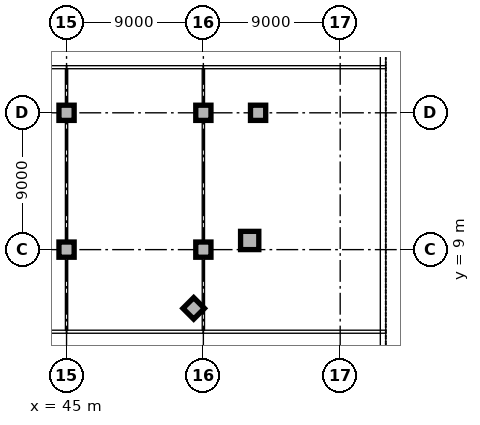
"""IFC4 building model, lengths in metres.
Left out: names, types, materials, properties, quantities, classifications, styles, units other than length and angle.
Written with IfcOpenShell. Run it as: python <this file> out.ifc"""

import sys

from ifc_helpers import new_model, si_unit, direction, frame, frame_2d, origin, origin_2d, place, context, subcontext, project, spatial, rectangle, extrude, element, fill, save


model = new_model("IFC4")
c1 = context("Model", 3, precision=1e-05, world=origin(), true_north=direction((0.0, 1.0)))
c2 = subcontext(c1, "Body", "Model", "MODEL_VIEW")
j1 = project(units=[si_unit("LENGTHUNIT", "METRE"), si_unit("PLANEANGLEUNIT", "RADIAN")], contexts=[c1])
p1 = place(None, origin())
s1 = spatial("IfcSite", under=j1, at=p1, CompositionType="ELEMENT")
p2 = place(p1, origin())
s2 = spatial("IfcBuilding", under=s1, at=p2, CompositionType="ELEMENT")
p3 = place(p2, origin())
s3 = spatial("IfcBuildingStorey", under=s2, at=p3, CompositionType="ELEMENT", Elevation=0.0)
p4 = place(p3, frame((57.047, 9.602, 0.0), z_axis=(0.0, 0.0, 1.0), x_axis=(1.0, 0.0, 0.0)))
e1 = element("IfcColumn", 1, at=p4, inside=s3, PredefinedType="COLUMN", context=c2, shape_type="SweptSolid", body=[
    extrude(rectangle(XDim=1.2, YDim=1.2, at=origin_2d()), origin(), (0.0, 0.0, 1.0), 5.7),
])
for number, where, z_axis, x_axis in (
    (2, (53.364, 5.136, 0.0), (0.0, 0.0, 1.0), (0.707, 0.707, 0.0)),
    (3, (57.6, 18.0, 0.0), (0.0, 0.0, 1.0), (1.0, 0.0, 0.0)),
    (4, (45.0, 9.0, 0.0), (0.0, 0.0, 1.0), (1.0, 0.0, 0.0)),
    (5, (45.0, 18.0, 0.0), (0.0, 0.0, 1.0), (1.0, 0.0, 0.0)),
    (6, (54.0, 9.0, 0.0), (0.0, 0.0, 1.0), (1.0, 0.0, 0.0)),
    (7, (54.0, 18.0, 0.0), (0.0, 0.0, 1.0), (1.0, 0.0, 0.0)),
):
    element("IfcColumn", number, at=place(p3, frame(where, z_axis=z_axis, x_axis=x_axis)), inside=s3, PredefinedType="COLUMN", context=c2, shape_type="SweptSolid", body=[
        extrude(rectangle(XDim=1.0, YDim=1.0, at=origin_2d()), origin(), (0.0, 0.0, 1.0), 5.7),
    ])
p5 = place(p3, frame((65.82, -9.0, 0.0), z_axis=(0.0, 0.0, 1.0), x_axis=(0.0, 1.0, 0.0)))
e8 = element("IfcWall", 8, at=p5, inside=s3, PredefinedType="STANDARD", context=c2, shape_type="SweptSolid", body=[
    extrude(rectangle(XDim=63.0, YDim=0.36, at=frame_2d((31.5, 0.0))), origin(), (0.0, 0.0, 1.0), 5.7),
])
p6 = place(p5, frame((30.6, 0.0, 0.0)))
e9 = element("IfcOpeningElement", 9, at=p6, cuts=e8, PredefinedType="OPENING", context=c2, shape_type="SweptSolid", body=[
    extrude(rectangle(XDim=1.8, YDim=2.2, at=frame_2d((0.9, 1.1))), frame((0.0, 0.19, 0.0), z_axis=(0.0, -1.0, 0.0), x_axis=(1.0, 0.0, 0.0)), (0.0, 0.0, 1.0), 0.38),
])
p7 = place(p5, frame((51.6, 0.0, 0.0)))
e10 = element("IfcOpeningElement", 10, at=p7, cuts=e8, PredefinedType="OPENING", context=c2, shape_type="SweptSolid", body=[
    extrude(rectangle(XDim=1.8, YDim=2.2, at=frame_2d((0.9, 1.1))), frame((0.0, 0.19, 0.0), z_axis=(0.0, -1.0, 0.0), x_axis=(1.0, 0.0, 0.0)), (0.0, 0.0, 1.0), 0.38),
])
p8 = place(p5, frame((9.6, 0.0, 0.0)))
e11 = element("IfcOpeningElement", 11, at=p8, cuts=e8, PredefinedType="OPENING", context=c2, shape_type="SweptSolid", body=[
    extrude(rectangle(XDim=2.4, YDim=2.2, at=frame_2d((1.2, 1.1))), frame((0.0, 0.19, 0.0), z_axis=(0.0, -1.0, 0.0), x_axis=(1.0, 0.0, 0.0)), (0.0, 0.0, 1.0), 0.38),
])
p9 = place(p5, frame((2.85, 0.0, 0.6)))
e12 = element("IfcOpeningElement", 12, at=p9, cuts=e8, PredefinedType="OPENING", context=c2, shape_type="SweptSolid", body=[
    extrude(rectangle(XDim=3.3, YDim=3.0, at=frame_2d((1.65, 1.5))), frame((0.0, 0.19, 0.0), z_axis=(0.0, -1.0, 0.0), x_axis=(1.0, 0.0, 0.0)), (0.0, 0.0, 1.0), 0.38),
])
p10 = place(p5, frame((16.35, 0.0, 0.6)))
e13 = element("IfcOpeningElement", 13, at=p10, cuts=e8, PredefinedType="OPENING", context=c2, shape_type="SweptSolid", body=[
    extrude(rectangle(XDim=3.3, YDim=3.0, at=frame_2d((1.65, 1.5))), frame((0.0, 0.19, 0.0), z_axis=(0.0, -1.0, 0.0), x_axis=(1.0, 0.0, 0.0)), (0.0, 0.0, 1.0), 0.38),
])
p11 = place(p5, frame((20.85, 0.0, 0.6)))
e14 = element("IfcOpeningElement", 14, at=p11, cuts=e8, PredefinedType="OPENING", context=c2, shape_type="SweptSolid", body=[
    extrude(rectangle(XDim=3.3, YDim=3.0, at=frame_2d((1.65, 1.5))), frame((0.0, 0.19, 0.0), z_axis=(0.0, -1.0, 0.0), x_axis=(1.0, 0.0, 0.0)), (0.0, 0.0, 1.0), 0.38),
])
p12 = place(p5, frame((25.35, 0.0, 0.6)))
e15 = element("IfcOpeningElement", 15, at=p12, cuts=e8, PredefinedType="OPENING", context=c2, shape_type="SweptSolid", body=[
    extrude(rectangle(XDim=3.3, YDim=3.0, at=frame_2d((1.65, 1.5))), frame((0.0, 0.19, 0.0), z_axis=(0.0, -1.0, 0.0), x_axis=(1.0, 0.0, 0.0)), (0.0, 0.0, 1.0), 0.38),
])
p13 = place(p5, frame((34.35, 0.0, 0.6)))
e16 = element("IfcOpeningElement", 16, at=p13, cuts=e8, PredefinedType="OPENING", context=c2, shape_type="SweptSolid", body=[
    extrude(rectangle(XDim=3.3, YDim=3.0, at=frame_2d((1.65, 1.5))), frame((0.0, 0.19, 0.0), z_axis=(0.0, -1.0, 0.0), x_axis=(1.0, 0.0, 0.0)), (0.0, 0.0, 1.0), 0.38),
])
p14 = place(p5, frame((38.85, 0.0, 0.6)))
e17 = element("IfcOpeningElement", 17, at=p14, cuts=e8, PredefinedType="OPENING", context=c2, shape_type="SweptSolid", body=[
    extrude(rectangle(XDim=3.3, YDim=3.0, at=frame_2d((1.65, 1.5))), frame((0.0, 0.19, 0.0), z_axis=(0.0, -1.0, 0.0), x_axis=(1.0, 0.0, 0.0)), (0.0, 0.0, 1.0), 0.38),
])
p15 = place(p5, frame((43.35, 0.0, 0.6)))
e18 = element("IfcOpeningElement", 18, at=p15, cuts=e8, PredefinedType="OPENING", context=c2, shape_type="SweptSolid", body=[
    extrude(rectangle(XDim=3.3, YDim=3.0, at=frame_2d((1.65, 1.5))), frame((0.0, 0.19, 0.0), z_axis=(0.0, -1.0, 0.0), x_axis=(1.0, 0.0, 0.0)), (0.0, 0.0, 1.0), 0.38),
])
p16 = place(p5, frame((47.85, 0.0, 0.6)))
e19 = element("IfcOpeningElement", 19, at=p16, cuts=e8, PredefinedType="OPENING", context=c2, shape_type="SweptSolid", body=[
    extrude(rectangle(XDim=3.3, YDim=3.0, at=frame_2d((1.65, 1.5))), frame((0.0, 0.19, 0.0), z_axis=(0.0, -1.0, 0.0), x_axis=(1.0, 0.0, 0.0)), (0.0, 0.0, 1.0), 0.38),
])
p17 = place(p5, frame((56.85, 0.0, 0.6)))
e20 = element("IfcOpeningElement", 20, at=p17, cuts=e8, PredefinedType="OPENING", context=c2, shape_type="SweptSolid", body=[
    extrude(rectangle(XDim=3.3, YDim=3.0, at=frame_2d((1.65, 1.5))), frame((0.0, 0.19, 0.0), z_axis=(0.0, -1.0, 0.0), x_axis=(1.0, 0.0, 0.0)), (0.0, 0.0, 1.0), 0.38),
])
p18 = place(p3, frame((36.0, 3.6, 0.0), z_axis=(0.0, 0.0, 1.0), x_axis=(1.0, 0.0, 0.0)))
e21 = element("IfcWall", 21, at=p18, inside=s3, PredefinedType="PARTITIONING", context=c2, shape_type="SweptSolid", body=[
    extrude(rectangle(XDim=9.0, YDim=0.2, at=frame_2d((4.5, 0.0))), origin(), (0.0, 0.0, 1.0), 5.7),
])
p19 = place(p18, frame((4.0, 0.0, 0.0)))
e22 = element("IfcOpeningElement", 22, at=p19, cuts=e21, PredefinedType="OPENING", context=c2, shape_type="SweptSolid", body=[
    extrude(rectangle(XDim=1.0, YDim=2.1, at=frame_2d((0.5, 1.05))), frame((0.0, 0.11, 0.0), z_axis=(0.0, -1.0, 0.0), x_axis=(1.0, 0.0, 0.0)), (0.0, 0.0, 1.0), 0.22),
])
p20 = place(p3, frame((45.0, 3.6, 0.0), z_axis=(0.0, 0.0, 1.0), x_axis=(1.0, 0.0, 0.0)))
e23 = element("IfcWall", 23, at=p20, inside=s3, PredefinedType="PARTITIONING", context=c2, shape_type="SweptSolid", body=[
    extrude(rectangle(XDim=9.0, YDim=0.2, at=frame_2d((4.5, 0.0))), origin(), (0.0, 0.0, 1.0), 5.7),
])
p21 = place(p20, frame((4.0, 0.0, 0.0)))
e24 = element("IfcOpeningElement", 24, at=p21, cuts=e23, PredefinedType="OPENING", context=c2, shape_type="SweptSolid", body=[
    extrude(rectangle(XDim=1.0, YDim=2.1, at=frame_2d((0.5, 1.05))), frame((0.0, 0.11, 0.0), z_axis=(0.0, -1.0, 0.0), x_axis=(1.0, 0.0, 0.0)), (0.0, 0.0, 1.0), 0.22),
])
p22 = place(p3, frame((54.0, 3.6, 0.0), z_axis=(0.0, 0.0, 1.0), x_axis=(1.0, 0.0, 0.0)))
e25 = element("IfcWall", 25, at=p22, inside=s3, PredefinedType="PARTITIONING", context=c2, shape_type="SweptSolid", body=[
    extrude(rectangle(XDim=12.0, YDim=0.2, at=frame_2d((6.0, 0.0))), origin(), (0.0, 0.0, 1.0), 5.7),
])
p23 = place(p22, frame((5.5, 0.0, 0.0)))
e26 = element("IfcOpeningElement", 26, at=p23, cuts=e25, PredefinedType="OPENING", context=c2, shape_type="SweptSolid", body=[
    extrude(rectangle(XDim=1.0, YDim=2.1, at=frame_2d((0.5, 1.05))), frame((0.0, 0.11, 0.0), z_axis=(0.0, -1.0, 0.0), x_axis=(1.0, 0.0, 0.0)), (0.0, 0.0, 1.0), 0.22),
])
for number, where, z_axis, x_axis in (
    (27, (36.0, 21.0, 0.0), (0.0, 0.0, 1.0), (1.0, 0.0, 0.0)),
    (28, (45.0, 21.0, 0.0), (0.0, 0.0, 1.0), (1.0, 0.0, 0.0)),
):
    element("IfcWall", number, at=place(p3, frame(where, z_axis=z_axis, x_axis=x_axis)), inside=s3, PredefinedType="PARTITIONING", context=c2, shape_type="SweptSolid", body=[
        extrude(rectangle(XDim=9.0, YDim=0.2, at=frame_2d((4.5, 0.0))), origin(), (0.0, 0.0, 1.0), 5.7),
    ])
p24 = place(p3, frame((54.0, 21.0, 0.0), z_axis=(0.0, 0.0, 1.0), x_axis=(1.0, 0.0, 0.0)))
e29 = element("IfcWall", 29, at=p24, inside=s3, PredefinedType="PARTITIONING", context=c2, shape_type="SweptSolid", body=[
    extrude(rectangle(XDim=12.0, YDim=0.2, at=frame_2d((6.0, 0.0))), origin(), (0.0, 0.0, 1.0), 5.7),
])
p25 = place(p3, frame((45.0, 3.7, 0.0), z_axis=(0.0, 0.0, 1.0), x_axis=(0.0, 1.0, 0.0)))
e30 = element("IfcWall", 30, at=p25, inside=s3, PredefinedType="PARTITIONING", context=c2, shape_type="SweptSolid", body=[
    extrude(rectangle(XDim=4.78, YDim=0.15, at=frame_2d((2.39, 0.0))), origin(), (0.0, 0.0, 1.0), 5.7),
])
p26 = place(p3, frame((45.0, 9.52, 0.0), z_axis=(0.0, 0.0, 1.0), x_axis=(0.0, 1.0, 0.0)))
e31 = element("IfcWall", 31, at=p26, inside=s3, PredefinedType="PARTITIONING", context=c2, shape_type="SweptSolid", body=[
    extrude(rectangle(XDim=7.96, YDim=0.15, at=frame_2d((3.98, 0.0))), origin(), (0.0, 0.0, 1.0), 5.7),
])
p27 = place(p3, frame((45.0, 18.52, 0.0), z_axis=(0.0, 0.0, 1.0), x_axis=(0.0, 1.0, 0.0)))
e32 = element("IfcWall", 32, at=p27, inside=s3, PredefinedType="PARTITIONING", context=c2, shape_type="SweptSolid", body=[
    extrude(rectangle(XDim=2.38, YDim=0.15, at=frame_2d((1.19, 0.0))), origin(), (0.0, 0.0, 1.0), 5.7),
])
p28 = place(p3, frame((54.0, 3.7, 0.0), z_axis=(0.0, 0.0, 1.0), x_axis=(0.0, 1.0, 0.0)))
e33 = element("IfcWall", 33, at=p28, inside=s3, PredefinedType="PARTITIONING", context=c2, shape_type="SweptSolid", body=[
    extrude(rectangle(XDim=4.78, YDim=0.15, at=frame_2d((2.39, 0.0))), origin(), (0.0, 0.0, 1.0), 5.7),
])
p29 = place(p3, frame((54.0, 9.52, 0.0), z_axis=(0.0, 0.0, 1.0), x_axis=(0.0, 1.0, 0.0)))
e34 = element("IfcWall", 34, at=p29, inside=s3, PredefinedType="PARTITIONING", context=c2, shape_type="SweptSolid", body=[
    extrude(rectangle(XDim=7.96, YDim=0.15, at=frame_2d((3.98, 0.0))), origin(), (0.0, 0.0, 1.0), 5.7),
])
p30 = place(p3, frame((54.0, 18.52, 0.0), z_axis=(0.0, 0.0, 1.0), x_axis=(0.0, 1.0, 0.0)))
e35 = element("IfcWall", 35, at=p30, inside=s3, PredefinedType="PARTITIONING", context=c2, shape_type="SweptSolid", body=[
    extrude(rectangle(XDim=2.38, YDim=0.15, at=frame_2d((1.19, 0.0))), origin(), (0.0, 0.0, 1.0), 5.7),
])
p31 = place(p6, frame((1.8, 0.0, 0.0), z_axis=(0.0, 0.0, 1.0), x_axis=(-1.0, 0.0, 0.0)))
e36 = element("IfcDoor", 36, at=p31, inside=s3, OperationType="DOUBLE_DOOR_SINGLE_SWING", PredefinedType="DOOR", context=c2, shape_type="SweptSolid", body=[
    extrude(rectangle(XDim=1.8, YDim=2.2, at=frame_2d((0.9, 1.1))), frame((0.0, -0.07, 0.0), z_axis=(0.0, -1.0, 0.0), x_axis=(1.0, 0.0, 0.0)), (0.0, 0.0, 1.0), 0.05),
])
fill(e9, e36)
p32 = place(p8, frame((2.4, 0.0, 0.0), z_axis=(0.0, 0.0, 1.0), x_axis=(-1.0, 0.0, 0.0)))
e37 = element("IfcDoor", 37, at=p32, inside=s3, OperationType="DOUBLE_DOOR_SINGLE_SWING", PredefinedType="DOOR", context=c2, shape_type="SweptSolid", body=[
    extrude(rectangle(XDim=2.4, YDim=2.2, at=frame_2d((1.2, 1.1))), frame((0.0, -0.07, 0.0), z_axis=(0.0, -1.0, 0.0), x_axis=(1.0, 0.0, 0.0)), (0.0, 0.0, 1.0), 0.05),
])
fill(e11, e37)
p33 = place(p10, origin())
e38 = element("IfcWindow", 38, at=p33, inside=s3, PartitioningType="SINGLE_PANEL", PredefinedType="WINDOW", context=c2, shape_type="SweptSolid", body=[
    extrude(rectangle(XDim=3.3, YDim=3.0, at=frame_2d((1.65, 1.5))), frame((0.0, 0.13, 0.0), z_axis=(0.0, -1.0, 0.0), x_axis=(1.0, 0.0, 0.0)), (0.0, 0.0, 1.0), 0.06),
])
fill(e13, e38)
p34 = place(p11, origin())
e39 = element("IfcWindow", 39, at=p34, inside=s3, PartitioningType="SINGLE_PANEL", PredefinedType="WINDOW", context=c2, shape_type="SweptSolid", body=[
    extrude(rectangle(XDim=3.3, YDim=3.0, at=frame_2d((1.65, 1.5))), frame((0.0, 0.13, 0.0), z_axis=(0.0, -1.0, 0.0), x_axis=(1.0, 0.0, 0.0)), (0.0, 0.0, 1.0), 0.06),
])
fill(e14, e39)
p35 = place(p12, origin())
e40 = element("IfcWindow", 40, at=p35, inside=s3, PartitioningType="SINGLE_PANEL", PredefinedType="WINDOW", context=c2, shape_type="SweptSolid", body=[
    extrude(rectangle(XDim=3.3, YDim=3.0, at=frame_2d((1.65, 1.5))), frame((0.0, 0.13, 0.0), z_axis=(0.0, -1.0, 0.0), x_axis=(1.0, 0.0, 0.0)), (0.0, 0.0, 1.0), 0.06),
])
fill(e15, e40)
p36 = place(p21, origin())
e41 = element("IfcDoor", 41, at=p36, inside=s3, OperationType="SINGLE_SWING_RIGHT", PredefinedType="DOOR", context=c2, shape_type="SweptSolid", body=[
    extrude(rectangle(XDim=1.0, YDim=2.1, at=frame_2d((0.5, 1.05))), frame((0.0, 0.025, 0.0), z_axis=(0.0, -1.0, 0.0), x_axis=(1.0, 0.0, 0.0)), (0.0, 0.0, 1.0), 0.05),
])
fill(e24, e41)
p37 = place(p23, frame((1.0, 0.0, 0.0), z_axis=(0.0, 0.0, 1.0), x_axis=(-1.0, 0.0, 0.0)))
e42 = element("IfcDoor", 42, at=p37, inside=s3, OperationType="SINGLE_SWING_RIGHT", PredefinedType="DOOR", context=c2, shape_type="SweptSolid", body=[
    extrude(rectangle(XDim=1.0, YDim=2.1, at=frame_2d((0.5, 1.05))), frame((0.0, 0.025, 0.0), z_axis=(0.0, -1.0, 0.0), x_axis=(1.0, 0.0, 0.0)), (0.0, 0.0, 1.0), 0.05),
])
fill(e26, e42)
save(model, sys.argv[1])
